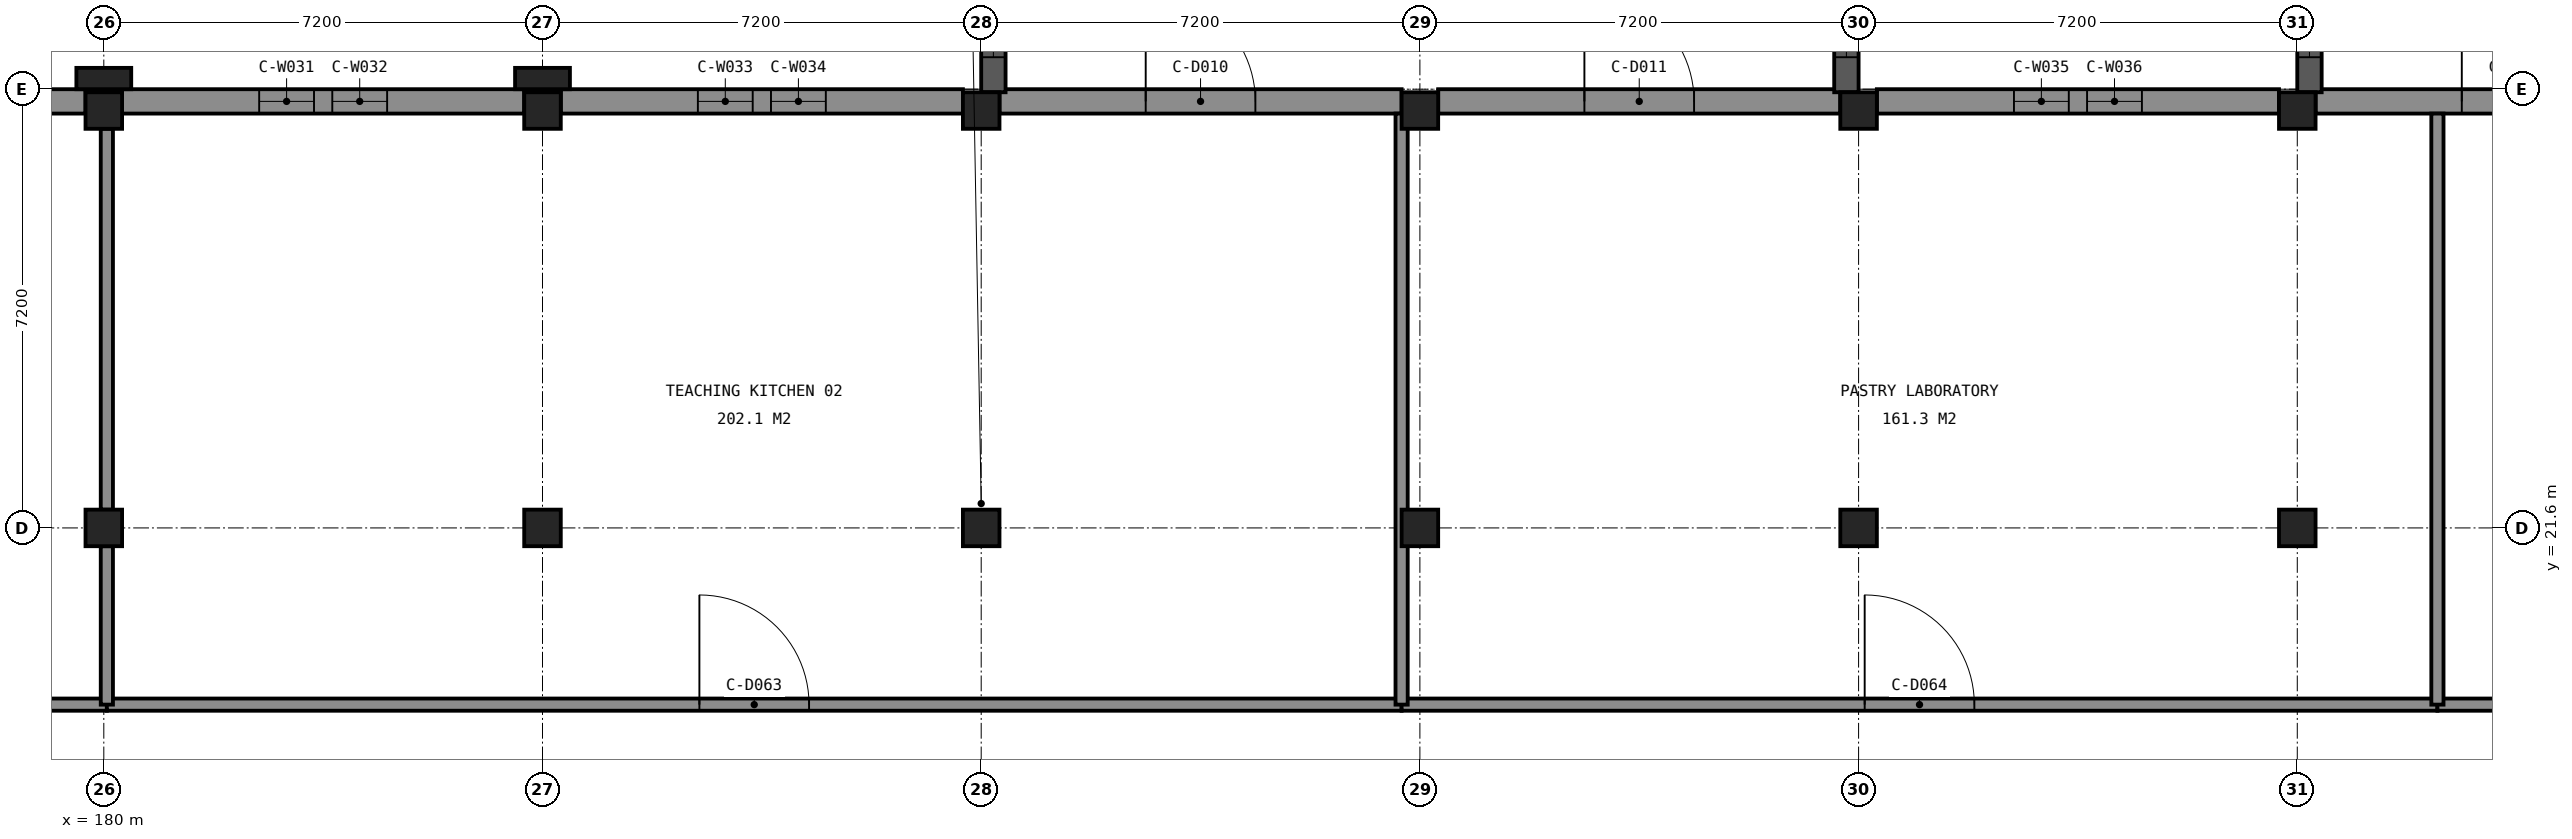
"""IFC4 building model, lengths in metres.
Left out: names, types, materials, properties, quantities, classifications, styles, units other than length and angle.
Written with IfcOpenShell. Run it as: python <this file> out.ifc"""

import sys

from ifc_helpers import new_model, si_unit, direction, frame, frame_2d, origin, origin_2d, place, context, subcontext, project, spatial, rectangle, extrude, element, fill, save


model = new_model("IFC4")
c1 = context("Model", 3, precision=1e-05, world=origin(), true_north=direction((0.0, 1.0)))
c2 = subcontext(c1, "Body", "Model", "MODEL_VIEW")
j1 = project(units=[si_unit("LENGTHUNIT", "METRE"), si_unit("PLANEANGLEUNIT", "RADIAN")], contexts=[c1])
p1 = place(None, origin())
s1 = spatial("IfcSite", under=j1, at=p1, CompositionType="ELEMENT")
p2 = place(p1, origin())
s2 = spatial("IfcBuilding", under=s1, at=p2, CompositionType="ELEMENT")
p3 = place(p2, frame((0.0, 0.0, 9.6)))
s3 = spatial("IfcBuildingStorey", under=s2, at=p3, CompositionType="ELEMENT", Elevation=9.6)
for number, where, z_axis, x_axis in (
    (1, (180.0, 28.45, 0.0), (0.0, 0.0, 1.0), (1.0, 0.0, 0.0)),
    (2, (187.2, 28.45, 0.0), (0.0, 0.0, 1.0), (1.0, 0.0, 0.0)),
    (3, (194.4, 28.45, 0.0), (0.0, 0.0, 1.0), (1.0, 0.0, 0.0)),
    (4, (201.6, 28.45, 0.0), (0.0, 0.0, 1.0), (1.0, 0.0, 0.0)),
    (5, (208.8, 28.45, 0.0), (0.0, 0.0, 1.0), (1.0, 0.0, 0.0)),
    (6, (216.0, 28.45, 0.0), (0.0, 0.0, 1.0), (1.0, 0.0, 0.0)),
    (7, (180.0, 21.6, 0.0), (0.0, 0.0, 1.0), (1.0, 0.0, 0.0)),
    (8, (187.2, 21.6, 0.0), (0.0, 0.0, 1.0), (1.0, 0.0, 0.0)),
    (9, (194.4, 21.6, 0.0), (0.0, 0.0, 1.0), (1.0, 0.0, 0.0)),
    (10, (201.6, 21.6, 0.0), (0.0, 0.0, 1.0), (1.0, 0.0, 0.0)),
    (11, (208.8, 21.6, 0.0), (0.0, 0.0, 1.0), (1.0, 0.0, 0.0)),
    (12, (216.0, 21.6, 0.0), (0.0, 0.0, 1.0), (1.0, 0.0, 0.0)),
):
    element("IfcColumn", number, at=place(p3, frame(where, z_axis=z_axis, x_axis=x_axis)), inside=s3, PredefinedType="COLUMN", context=c2, shape_type="SweptSolid", body=[
        extrude(rectangle(XDim=0.6, YDim=0.6, at=origin_2d()), origin(), (0.0, 0.0, 1.0), 4.8),
    ])
p4 = place(p3, frame((173.1, 28.6, 0.0), z_axis=(0.0, 0.0, 1.0), x_axis=(1.0, 0.0, 0.0)))
e13 = element("IfcWall", 13, at=p4, inside=s3, PredefinedType="SOLIDWALL", context=c2, shape_type="SweptSolid", body=[
    extrude(rectangle(XDim=6.6, YDim=0.4, at=frame_2d((3.3, 0.0))), origin(), (0.0, 0.0, 1.0), 3.95),
])
p5 = place(p4, frame((2.25, 0.0, 0.9)))
e14 = element("IfcOpeningElement", 14, at=p5, cuts=e13, PredefinedType="OPENING", context=c2, shape_type="SweptSolid", body=[
    extrude(rectangle(XDim=0.9, YDim=2.7, at=frame_2d((0.45, 1.35))), frame((0.0, 0.21, 0.0), z_axis=(0.0, -1.0, 0.0), x_axis=(1.0, 0.0, 0.0)), (0.0, 0.0, 1.0), 0.42),
])
p6 = place(p4, frame((3.45, 0.0, 0.9)))
e15 = element("IfcOpeningElement", 15, at=p6, cuts=e13, PredefinedType="OPENING", context=c2, shape_type="SweptSolid", body=[
    extrude(rectangle(XDim=0.9, YDim=2.7, at=frame_2d((0.45, 1.35))), frame((0.0, 0.21, 0.0), z_axis=(0.0, -1.0, 0.0), x_axis=(1.0, 0.0, 0.0)), (0.0, 0.0, 1.0), 0.42),
])
p7 = place(p3, frame((180.3, 28.6, 0.0), z_axis=(0.0, 0.0, 1.0), x_axis=(1.0, 0.0, 0.0)))
e16 = element("IfcWall", 16, at=p7, inside=s3, PredefinedType="SOLIDWALL", context=c2, shape_type="SweptSolid", body=[
    extrude(rectangle(XDim=6.6, YDim=0.4, at=frame_2d((3.3, 0.0))), origin(), (0.0, 0.0, 1.0), 3.95),
])
p8 = place(p7, frame((2.25, 0.0, 0.9)))
e17 = element("IfcOpeningElement", 17, at=p8, cuts=e16, PredefinedType="OPENING", context=c2, shape_type="SweptSolid", body=[
    extrude(rectangle(XDim=0.9, YDim=2.7, at=frame_2d((0.45, 1.35))), frame((0.0, 0.21, 0.0), z_axis=(0.0, -1.0, 0.0), x_axis=(1.0, 0.0, 0.0)), (0.0, 0.0, 1.0), 0.42),
])
p9 = place(p7, frame((3.45, 0.0, 0.9)))
e18 = element("IfcOpeningElement", 18, at=p9, cuts=e16, PredefinedType="OPENING", context=c2, shape_type="SweptSolid", body=[
    extrude(rectangle(XDim=0.9, YDim=2.7, at=frame_2d((0.45, 1.35))), frame((0.0, 0.21, 0.0), z_axis=(0.0, -1.0, 0.0), x_axis=(1.0, 0.0, 0.0)), (0.0, 0.0, 1.0), 0.42),
])
p10 = place(p3, frame((187.5, 28.6, 0.0), z_axis=(0.0, 0.0, 1.0), x_axis=(1.0, 0.0, 0.0)))
e19 = element("IfcWall", 19, at=p10, inside=s3, PredefinedType="SOLIDWALL", context=c2, shape_type="SweptSolid", body=[
    extrude(rectangle(XDim=6.6, YDim=0.4, at=frame_2d((3.3, 0.0))), origin(), (0.0, 0.0, 1.0), 3.95),
])
p11 = place(p10, frame((2.25, 0.0, 0.9)))
e20 = element("IfcOpeningElement", 20, at=p11, cuts=e19, PredefinedType="OPENING", context=c2, shape_type="SweptSolid", body=[
    extrude(rectangle(XDim=0.9, YDim=2.7, at=frame_2d((0.45, 1.35))), frame((0.0, 0.21, 0.0), z_axis=(0.0, -1.0, 0.0), x_axis=(1.0, 0.0, 0.0)), (0.0, 0.0, 1.0), 0.42),
])
p12 = place(p10, frame((3.45, 0.0, 0.9)))
e21 = element("IfcOpeningElement", 21, at=p12, cuts=e19, PredefinedType="OPENING", context=c2, shape_type="SweptSolid", body=[
    extrude(rectangle(XDim=0.9, YDim=2.7, at=frame_2d((0.45, 1.35))), frame((0.0, 0.21, 0.0), z_axis=(0.0, -1.0, 0.0), x_axis=(1.0, 0.0, 0.0)), (0.0, 0.0, 1.0), 0.42),
])
p13 = place(p3, frame((194.7, 28.6, 0.0), z_axis=(0.0, 0.0, 1.0), x_axis=(1.0, 0.0, 0.0)))
e22 = element("IfcWall", 22, at=p13, inside=s3, PredefinedType="SOLIDWALL", context=c2, shape_type="SweptSolid", body=[
    extrude(rectangle(XDim=6.6, YDim=0.4, at=frame_2d((3.3, 0.0))), origin(), (0.0, 0.0, 1.0), 3.95),
])
p14 = place(p13, frame((2.4, 0.0, 0.0)))
e23 = element("IfcOpeningElement", 23, at=p14, cuts=e22, PredefinedType="OPENING", context=c2, shape_type="SweptSolid", body=[
    extrude(rectangle(XDim=1.8, YDim=2.1, at=frame_2d((0.9, 1.05))), frame((0.0, 0.21, 0.0), z_axis=(0.0, -1.0, 0.0), x_axis=(1.0, 0.0, 0.0)), (0.0, 0.0, 1.0), 0.42),
])
p15 = place(p3, frame((201.9, 28.6, 0.0), z_axis=(0.0, 0.0, 1.0), x_axis=(1.0, 0.0, 0.0)))
e24 = element("IfcWall", 24, at=p15, inside=s3, PredefinedType="SOLIDWALL", context=c2, shape_type="SweptSolid", body=[
    extrude(rectangle(XDim=6.6, YDim=0.4, at=frame_2d((3.3, 0.0))), origin(), (0.0, 0.0, 1.0), 3.95),
])
p16 = place(p15, frame((2.4, 0.0, 0.0)))
e25 = element("IfcOpeningElement", 25, at=p16, cuts=e24, PredefinedType="OPENING", context=c2, shape_type="SweptSolid", body=[
    extrude(rectangle(XDim=1.8, YDim=2.1, at=frame_2d((0.9, 1.05))), frame((0.0, 0.21, 0.0), z_axis=(0.0, -1.0, 0.0), x_axis=(1.0, 0.0, 0.0)), (0.0, 0.0, 1.0), 0.42),
])
p17 = place(p3, frame((209.1, 28.6, 0.0), z_axis=(0.0, 0.0, 1.0), x_axis=(1.0, 0.0, 0.0)))
e26 = element("IfcWall", 26, at=p17, inside=s3, PredefinedType="SOLIDWALL", context=c2, shape_type="SweptSolid", body=[
    extrude(rectangle(XDim=6.6, YDim=0.4, at=frame_2d((3.3, 0.0))), origin(), (0.0, 0.0, 1.0), 3.95),
])
p18 = place(p17, frame((2.25, 0.0, 0.9)))
e27 = element("IfcOpeningElement", 27, at=p18, cuts=e26, PredefinedType="OPENING", context=c2, shape_type="SweptSolid", body=[
    extrude(rectangle(XDim=0.9, YDim=2.7, at=frame_2d((0.45, 1.35))), frame((0.0, 0.21, 0.0), z_axis=(0.0, -1.0, 0.0), x_axis=(1.0, 0.0, 0.0)), (0.0, 0.0, 1.0), 0.42),
])
p19 = place(p17, frame((3.45, 0.0, 0.9)))
e28 = element("IfcOpeningElement", 28, at=p19, cuts=e26, PredefinedType="OPENING", context=c2, shape_type="SweptSolid", body=[
    extrude(rectangle(XDim=0.9, YDim=2.7, at=frame_2d((0.45, 1.35))), frame((0.0, 0.21, 0.0), z_axis=(0.0, -1.0, 0.0), x_axis=(1.0, 0.0, 0.0)), (0.0, 0.0, 1.0), 0.42),
])
p20 = place(p3, frame((216.3, 28.6, 0.0), z_axis=(0.0, 0.0, 1.0), x_axis=(1.0, 0.0, 0.0)))
e29 = element("IfcWall", 29, at=p20, inside=s3, PredefinedType="SOLIDWALL", context=c2, shape_type="SweptSolid", body=[
    extrude(rectangle(XDim=6.6, YDim=0.4, at=frame_2d((3.3, 0.0))), origin(), (0.0, 0.0, 1.0), 3.95),
])
p21 = place(p20, frame((2.4, 0.0, 0.0)))
e30 = element("IfcOpeningElement", 30, at=p21, cuts=e29, PredefinedType="OPENING", context=c2, shape_type="SweptSolid", body=[
    extrude(rectangle(XDim=1.8, YDim=2.1, at=frame_2d((0.9, 1.05))), frame((0.0, 0.21, 0.0), z_axis=(0.0, -1.0, 0.0), x_axis=(1.0, 0.0, 0.0)), (0.0, 0.0, 1.0), 0.42),
])
for number, where, z_axis, x_axis in (
    (31, (180.0, 28.975, 0.0), (0.0, 0.0, 1.0), (1.0, 0.0, 0.0)),
    (32, (187.2, 28.975, 0.0), (0.0, 0.0, 1.0), (1.0, 0.0, 0.0)),
):
    element("IfcColumn", number, at=place(p3, frame(where, z_axis=z_axis, x_axis=x_axis)), inside=s3, PredefinedType="PILASTER", context=c2, shape_type="SweptSolid", body=[
        extrude(rectangle(XDim=0.9, YDim=0.35, at=origin_2d()), origin(), (0.0, 0.0, 1.0), 4.8),
    ])
p22 = place(p3, frame((194.6, 28.75, 0.0), z_axis=(0.0, 0.0, 1.0), x_axis=(0.0, 1.0, 0.0)))
e33 = element("IfcWall", 33, at=p22, inside=s3, PredefinedType="SOLIDWALL", context=c2, shape_type="SweptSolid", body=[
    extrude(rectangle(XDim=2.05, YDim=0.4, at=frame_2d((1.025, 0.0))), origin(), (0.0, 0.0, 1.0), 4.55),
])
p23 = place(p22, frame((0.575, 0.0, 0.9)))
e34 = element("IfcOpeningElement", 34, at=p23, cuts=e33, PredefinedType="OPENING", context=c2, shape_type="SweptSolid", body=[
    extrude(rectangle(XDim=0.9, YDim=2.7, at=frame_2d((0.45, 1.35))), frame((0.0, 0.21, 0.0), z_axis=(0.0, -1.0, 0.0), x_axis=(1.0, 0.0, 0.0)), (0.0, 0.0, 1.0), 0.42),
])
p24 = place(p3, frame((208.6, 30.8, 0.0), z_axis=(0.0, 0.0, 1.0), x_axis=(0.0, -1.0, 0.0)))
e35 = element("IfcWall", 35, at=p24, inside=s3, PredefinedType="SOLIDWALL", context=c2, shape_type="SweptSolid", body=[
    extrude(rectangle(XDim=2.05, YDim=0.4, at=frame_2d((1.025, 0.0))), origin(), (0.0, 0.0, 1.0), 4.55),
])
p25 = place(p24, frame((0.575, 0.0, 0.9)))
e36 = element("IfcOpeningElement", 36, at=p25, cuts=e35, PredefinedType="OPENING", context=c2, shape_type="SweptSolid", body=[
    extrude(rectangle(XDim=0.9, YDim=2.7, at=frame_2d((0.45, 1.35))), frame((0.0, 0.21, 0.0), z_axis=(0.0, -1.0, 0.0), x_axis=(1.0, 0.0, 0.0)), (0.0, 0.0, 1.0), 0.42),
])
p26 = place(p3, frame((216.2, 28.75, 0.0), z_axis=(0.0, 0.0, 1.0), x_axis=(0.0, 1.0, 0.0)))
e37 = element("IfcWall", 37, at=p26, inside=s3, PredefinedType="SOLIDWALL", context=c2, shape_type="SweptSolid", body=[
    extrude(rectangle(XDim=2.05, YDim=0.4, at=frame_2d((1.025, 0.0))), origin(), (0.0, 0.0, 1.0), 4.55),
])
p27 = place(p26, frame((0.575, 0.0, 0.9)))
e38 = element("IfcOpeningElement", 38, at=p27, cuts=e37, PredefinedType="OPENING", context=c2, shape_type="SweptSolid", body=[
    extrude(rectangle(XDim=0.9, YDim=2.7, at=frame_2d((0.45, 1.35))), frame((0.0, 0.21, 0.0), z_axis=(0.0, -1.0, 0.0), x_axis=(1.0, 0.0, 0.0)), (0.0, 0.0, 1.0), 0.42),
])
p28 = place(p3, frame((158.8, 18.7, 0.0), z_axis=(0.0, 0.0, 1.0), x_axis=(1.0, 0.0, 0.0)))
e39 = element("IfcWall", 39, at=p28, inside=s3, PredefinedType="PARTITIONING", context=c2, shape_type="SweptSolid", body=[
    extrude(rectangle(XDim=21.25, YDim=0.2, at=frame_2d((10.625, 0.0))), origin(), (0.0, 0.0, 1.0), 3.95),
])
p29 = place(p28, frame((9.725, 0.0, 0.0)))
e40 = element("IfcOpeningElement", 40, at=p29, cuts=e39, PredefinedType="OPENING", context=c2, shape_type="SweptSolid", body=[
    extrude(rectangle(XDim=1.8, YDim=2.1, at=frame_2d((0.9, 1.05))), frame((0.0, 0.11, 0.0), z_axis=(0.0, -1.0, 0.0), x_axis=(1.0, 0.0, 0.0)), (0.0, 0.0, 1.0), 0.22),
])
p30 = place(p3, frame((180.05, 18.7, 0.0), z_axis=(0.0, 0.0, 1.0), x_axis=(1.0, 0.0, 0.0)))
e41 = element("IfcWall", 41, at=p30, inside=s3, PredefinedType="PARTITIONING", context=c2, shape_type="SweptSolid", body=[
    extrude(rectangle(XDim=21.25, YDim=0.2, at=frame_2d((10.625, 0.0))), origin(), (0.0, 0.0, 1.0), 3.95),
])
p31 = place(p30, frame((9.725, 0.0, 0.0)))
e42 = element("IfcOpeningElement", 42, at=p31, cuts=e41, PredefinedType="OPENING", context=c2, shape_type="SweptSolid", body=[
    extrude(rectangle(XDim=1.8, YDim=2.1, at=frame_2d((0.9, 1.05))), frame((0.0, 0.11, 0.0), z_axis=(0.0, -1.0, 0.0), x_axis=(1.0, 0.0, 0.0)), (0.0, 0.0, 1.0), 0.22),
])
p32 = place(p3, frame((201.3, 18.7, 0.0), z_axis=(0.0, 0.0, 1.0), x_axis=(1.0, 0.0, 0.0)))
e43 = element("IfcWall", 43, at=p32, inside=s3, PredefinedType="PARTITIONING", context=c2, shape_type="SweptSolid", body=[
    extrude(rectangle(XDim=17.0, YDim=0.2, at=frame_2d((8.5, 0.0))), origin(), (0.0, 0.0, 1.0), 3.95),
])
p33 = place(p32, frame((7.6, 0.0, 0.0)))
e44 = element("IfcOpeningElement", 44, at=p33, cuts=e43, PredefinedType="OPENING", context=c2, shape_type="SweptSolid", body=[
    extrude(rectangle(XDim=1.8, YDim=2.1, at=frame_2d((0.9, 1.05))), frame((0.0, 0.11, 0.0), z_axis=(0.0, -1.0, 0.0), x_axis=(1.0, 0.0, 0.0)), (0.0, 0.0, 1.0), 0.22),
])
p34 = place(p3, frame((218.3, 18.7, 0.0), z_axis=(0.0, 0.0, 1.0), x_axis=(1.0, 0.0, 0.0)))
e45 = element("IfcWall", 45, at=p34, inside=s3, PredefinedType="PARTITIONING", context=c2, shape_type="SweptSolid", body=[
    extrude(rectangle(XDim=11.7, YDim=0.2, at=frame_2d((5.85, 0.0))), origin(), (0.0, 0.0, 1.0), 3.95),
])
p35 = place(p34, frame((5.35, 0.0, 0.0)))
e46 = element("IfcOpeningElement", 46, at=p35, cuts=e45, PredefinedType="OPENING", context=c2, shape_type="SweptSolid", body=[
    extrude(rectangle(XDim=1.0, YDim=2.1, at=frame_2d((0.5, 1.05))), frame((0.0, 0.11, 0.0), z_axis=(0.0, -1.0, 0.0), x_axis=(1.0, 0.0, 0.0)), (0.0, 0.0, 1.0), 0.22),
])
p36 = place(p3, frame((180.05, 28.15, 0.0), z_axis=(0.0, 0.0, 1.0), x_axis=(0.0, -1.0, 0.0)))
e47 = element("IfcWall", 47, at=p36, inside=s3, PredefinedType="PARTITIONING", context=c2, shape_type="SweptSolid", body=[
    extrude(rectangle(XDim=6.25, YDim=0.2, at=frame_2d((3.125, 0.0))), origin(), (0.0, 0.0, 1.0), 3.95),
])
p37 = place(p3, frame((180.05, 21.3, 0.0), z_axis=(0.0, 0.0, 1.0), x_axis=(0.0, -1.0, 0.0)))
e48 = element("IfcWall", 48, at=p37, inside=s3, PredefinedType="PARTITIONING", context=c2, shape_type="SweptSolid", body=[
    extrude(rectangle(XDim=2.6, YDim=0.2, at=frame_2d((1.3, 0.0))), origin(), (0.0, 0.0, 1.0), 3.95),
])
for number, where, z_axis, x_axis in (
    (49, (201.3, 28.4, 0.0), (0.0, 0.0, 1.0), (0.0, -1.0, 0.0)),
    (50, (218.3, 28.4, 0.0), (0.0, 0.0, 1.0), (0.0, -1.0, 0.0)),
):
    element("IfcWall", number, at=place(p3, frame(where, z_axis=z_axis, x_axis=x_axis)), inside=s3, PredefinedType="PARTITIONING", context=c2, shape_type="SweptSolid", body=[
        extrude(rectangle(XDim=9.7, YDim=0.2, at=frame_2d((4.85, 0.0))), origin(), (0.0, 0.0, 1.0), 3.95),
    ])
p38 = place(p8, origin())
e51 = element("IfcWindow", 51, at=p38, inside=s3, PartitioningType="SINGLE_PANEL", PredefinedType="WINDOW", context=c2, shape_type="SweptSolid", body=[
    extrude(rectangle(XDim=0.9, YDim=2.7, at=frame_2d((0.45, 1.35))), frame((0.0, -0.09, 0.0), z_axis=(0.0, -1.0, 0.0), x_axis=(1.0, 0.0, 0.0)), (0.0, 0.0, 1.0), 0.06),
])
fill(e17, e51)
p39 = place(p9, origin())
e52 = element("IfcWindow", 52, at=p39, inside=s3, PartitioningType="SINGLE_PANEL", PredefinedType="WINDOW", context=c2, shape_type="SweptSolid", body=[
    extrude(rectangle(XDim=0.9, YDim=2.7, at=frame_2d((0.45, 1.35))), frame((0.0, -0.09, 0.0), z_axis=(0.0, -1.0, 0.0), x_axis=(1.0, 0.0, 0.0)), (0.0, 0.0, 1.0), 0.06),
])
fill(e18, e52)
p40 = place(p11, origin())
e53 = element("IfcWindow", 53, at=p40, inside=s3, PartitioningType="SINGLE_PANEL", PredefinedType="WINDOW", context=c2, shape_type="SweptSolid", body=[
    extrude(rectangle(XDim=0.9, YDim=2.7, at=frame_2d((0.45, 1.35))), frame((0.0, -0.09, 0.0), z_axis=(0.0, -1.0, 0.0), x_axis=(1.0, 0.0, 0.0)), (0.0, 0.0, 1.0), 0.06),
])
fill(e20, e53)
p41 = place(p12, origin())
e54 = element("IfcWindow", 54, at=p41, inside=s3, PartitioningType="SINGLE_PANEL", PredefinedType="WINDOW", context=c2, shape_type="SweptSolid", body=[
    extrude(rectangle(XDim=0.9, YDim=2.7, at=frame_2d((0.45, 1.35))), frame((0.0, -0.09, 0.0), z_axis=(0.0, -1.0, 0.0), x_axis=(1.0, 0.0, 0.0)), (0.0, 0.0, 1.0), 0.06),
])
fill(e21, e54)
p42 = place(p14, origin())
e55 = element("IfcDoor", 55, at=p42, inside=s3, OperationType="NOTDEFINED", PredefinedType="DOOR", context=c2, shape_type="SweptSolid", body=[
    extrude(rectangle(XDim=1.8, YDim=2.1, at=frame_2d((0.9, 1.05))), frame((0.0, 0.025, 0.0), z_axis=(0.0, -1.0, 0.0), x_axis=(1.0, 0.0, 0.0)), (0.0, 0.0, 1.0), 0.05),
])
fill(e23, e55)
p43 = place(p16, origin())
e56 = element("IfcDoor", 56, at=p43, inside=s3, OperationType="NOTDEFINED", PredefinedType="DOOR", context=c2, shape_type="SweptSolid", body=[
    extrude(rectangle(XDim=1.8, YDim=2.1, at=frame_2d((0.9, 1.05))), frame((0.0, 0.025, 0.0), z_axis=(0.0, -1.0, 0.0), x_axis=(1.0, 0.0, 0.0)), (0.0, 0.0, 1.0), 0.05),
])
fill(e25, e56)
p44 = place(p18, origin())
e57 = element("IfcWindow", 57, at=p44, inside=s3, PartitioningType="SINGLE_PANEL", PredefinedType="WINDOW", context=c2, shape_type="SweptSolid", body=[
    extrude(rectangle(XDim=0.9, YDim=2.7, at=frame_2d((0.45, 1.35))), frame((0.0, -0.09, 0.0), z_axis=(0.0, -1.0, 0.0), x_axis=(1.0, 0.0, 0.0)), (0.0, 0.0, 1.0), 0.06),
])
fill(e27, e57)
p45 = place(p19, origin())
e58 = element("IfcWindow", 58, at=p45, inside=s3, PartitioningType="SINGLE_PANEL", PredefinedType="WINDOW", context=c2, shape_type="SweptSolid", body=[
    extrude(rectangle(XDim=0.9, YDim=2.7, at=frame_2d((0.45, 1.35))), frame((0.0, -0.09, 0.0), z_axis=(0.0, -1.0, 0.0), x_axis=(1.0, 0.0, 0.0)), (0.0, 0.0, 1.0), 0.06),
])
fill(e28, e58)
p46 = place(p21, origin())
e59 = element("IfcDoor", 59, at=p46, inside=s3, OperationType="NOTDEFINED", PredefinedType="DOOR", context=c2, shape_type="SweptSolid", body=[
    extrude(rectangle(XDim=1.8, YDim=2.1, at=frame_2d((0.9, 1.05))), frame((0.0, 0.025, 0.0), z_axis=(0.0, -1.0, 0.0), x_axis=(1.0, 0.0, 0.0)), (0.0, 0.0, 1.0), 0.05),
])
fill(e30, e59)
p47 = place(p23, origin())
e60 = element("IfcWindow", 60, at=p47, inside=s3, PartitioningType="SINGLE_PANEL", PredefinedType="WINDOW", context=c2, shape_type="SweptSolid", body=[
    extrude(rectangle(XDim=0.9, YDim=2.7, at=frame_2d((0.45, 1.35))), frame((0.0, -0.09, 0.0), z_axis=(0.0, -1.0, 0.0), x_axis=(1.0, 0.0, 0.0)), (0.0, 0.0, 1.0), 0.06),
])
fill(e34, e60)
p48 = place(p25, origin())
e61 = element("IfcWindow", 61, at=p48, inside=s3, PartitioningType="SINGLE_PANEL", PredefinedType="WINDOW", context=c2, shape_type="SweptSolid", body=[
    extrude(rectangle(XDim=0.9, YDim=2.7, at=frame_2d((0.45, 1.35))), frame((0.0, -0.09, 0.0), z_axis=(0.0, -1.0, 0.0), x_axis=(1.0, 0.0, 0.0)), (0.0, 0.0, 1.0), 0.06),
])
fill(e36, e61)
p49 = place(p27, origin())
e62 = element("IfcWindow", 62, at=p49, inside=s3, PartitioningType="SINGLE_PANEL", PredefinedType="WINDOW", context=c2, shape_type="SweptSolid", body=[
    extrude(rectangle(XDim=0.9, YDim=2.7, at=frame_2d((0.45, 1.35))), frame((0.0, -0.09, 0.0), z_axis=(0.0, -1.0, 0.0), x_axis=(1.0, 0.0, 0.0)), (0.0, 0.0, 1.0), 0.06),
])
fill(e38, e62)
p50 = place(p31, origin())
e63 = element("IfcDoor", 63, at=p50, inside=s3, OperationType="NOTDEFINED", PredefinedType="DOOR", context=c2, shape_type="SweptSolid", body=[
    extrude(rectangle(XDim=1.8, YDim=2.1, at=frame_2d((0.9, 1.05))), frame((0.0, 0.025, 0.0), z_axis=(0.0, -1.0, 0.0), x_axis=(1.0, 0.0, 0.0)), (0.0, 0.0, 1.0), 0.05),
])
fill(e42, e63)
p51 = place(p33, origin())
e64 = element("IfcDoor", 64, at=p51, inside=s3, OperationType="NOTDEFINED", PredefinedType="DOOR", context=c2, shape_type="SweptSolid", body=[
    extrude(rectangle(XDim=1.8, YDim=2.1, at=frame_2d((0.9, 1.05))), frame((0.0, 0.025, 0.0), z_axis=(0.0, -1.0, 0.0), x_axis=(1.0, 0.0, 0.0)), (0.0, 0.0, 1.0), 0.05),
])
fill(e44, e64)
save(model, sys.argv[1])
